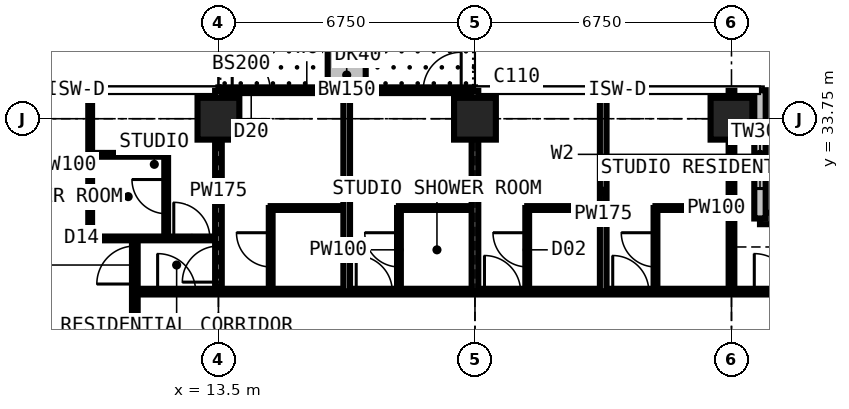
"""IFC4 building model, lengths in metres.
Left out: names, types, materials, properties, quantities, classifications, styles, units other than length and angle.
Written with IfcOpenShell. Run it as: python <this file> out.ifc"""

import sys

from ifc_helpers import new_model, si_unit, direction, frame, frame_2d, origin, origin_2d, place, context, subcontext, project, spatial, rectangle, extrude, element, fill, save


model = new_model("IFC4")
c1 = context("Model", 3, precision=1e-05, world=origin(), true_north=direction((0.0, 1.0)))
c2 = subcontext(c1, "Body", "Model", "MODEL_VIEW")
j1 = project(units=[si_unit("LENGTHUNIT", "METRE"), si_unit("PLANEANGLEUNIT", "RADIAN")], contexts=[c1])
p1 = place(None, origin())
s1 = spatial("IfcSite", under=j1, at=p1, CompositionType="ELEMENT")
p2 = place(p1, origin())
s2 = spatial("IfcBuilding", under=s1, at=p2, CompositionType="ELEMENT")
p3 = place(p2, frame((0.0, 0.0, 211.5)))
s3 = spatial("IfcBuildingStorey", under=s2, at=p3, CompositionType="ELEMENT", Elevation=211.5)
for number, where, z_axis, x_axis in (
    (1, (13.5, 33.75, 0.0), (0.0, 0.0, 1.0), (1.0, 0.0, 0.0)),
    (2, (20.25, 33.75, 0.0), (0.0, 0.0, 1.0), (1.0, 0.0, 0.0)),
    (3, (27.0, 33.75, 0.0), (0.0, 0.0, 1.0), (1.0, 0.0, 0.0)),
):
    element("IfcColumn", number, at=place(p3, frame(where, z_axis=z_axis, x_axis=x_axis)), inside=s3, PredefinedType="COLUMN", context=c2, shape_type="SweptSolid", body=[
        extrude(rectangle(XDim=1.1, YDim=1.1, at=origin_2d()), origin(), (0.0, 0.0, 1.0), 3.6),
    ])
p4 = place(p3, frame((31.125, 31.125, 0.0), z_axis=(0.0, 0.0, 1.0), x_axis=(-1.0, 0.0, 0.0)))
e4 = element("IfcWall", 4, at=p4, inside=s3, PredefinedType="SOLIDWALL", context=c2, shape_type="SweptSolid", body=[
    extrude(rectangle(XDim=3.375, YDim=0.3, at=frame_2d((1.688, 0.0))), origin(), (0.0, 0.0, 1.0), 3.375),
])
p5 = place(p4, frame((0.788, 0.0, 0.6)))
e5 = element("IfcOpeningElement", 5, at=p5, cuts=e4, PredefinedType="OPENING", context=c2, shape_type="SweptSolid", body=[
    extrude(rectangle(XDim=1.8, YDim=2.1, at=frame_2d((0.9, 1.05))), frame((0.0, 0.16, 0.0), z_axis=(0.0, -1.0, 0.0), x_axis=(1.0, 0.0, 0.0)), (0.0, 0.0, 1.0), 0.32),
])
p6 = place(p3, frame((27.75, 31.125, 0.0), z_axis=(0.0, 0.0, 1.0), x_axis=(0.0, 1.0, 0.0)))
e6 = element("IfcWall", 6, at=p6, inside=s3, PredefinedType="SOLIDWALL", context=c2, shape_type="SweptSolid", body=[
    extrude(rectangle(XDim=3.375, YDim=0.3, at=frame_2d((1.688, 0.0))), origin(), (0.0, 0.0, 1.0), 3.375),
])
p7 = place(p6, frame((0.788, 0.0, 0.6)))
e7 = element("IfcOpeningElement", 7, at=p7, cuts=e6, PredefinedType="OPENING", context=c2, shape_type="SweptSolid", body=[
    extrude(rectangle(XDim=1.8, YDim=2.1, at=frame_2d((0.9, 1.05))), frame((0.0, 0.16, 0.0), z_axis=(0.0, -1.0, 0.0), x_axis=(1.0, 0.0, 0.0)), (0.0, 0.0, 1.0), 0.32),
])
p8 = place(p3, frame((13.5, 34.5, 0.0), z_axis=(0.0, 0.0, 1.0), x_axis=(1.0, 0.0, 0.0)))
e8 = element("IfcWall", 8, at=p8, inside=s3, PredefinedType="SOLIDWALL", context=c2, shape_type="SweptSolid", body=[
    extrude(rectangle(XDim=6.75, YDim=0.15, at=frame_2d((3.375, 0.0))), origin(), (0.0, 0.0, 1.0), 3.375),
])
p9 = place(p8, frame((0.363, 0.0, 0.0)))
e9 = element("IfcOpeningElement", 9, at=p9, cuts=e8, PredefinedType="OPENING", context=c2, shape_type="SweptSolid", body=[
    extrude(rectangle(XDim=1.0, YDim=2.2, at=frame_2d((0.5, 1.1))), frame((0.0, 0.085, 0.0), z_axis=(0.0, -1.0, 0.0), x_axis=(1.0, 0.0, 0.0)), (0.0, 0.0, 1.0), 0.17),
])
p10 = place(p8, frame((1.725, 0.0, 0.9)))
e10 = element("IfcOpeningElement", 10, at=p10, cuts=e8, PredefinedType="OPENING", context=c2, shape_type="SweptSolid", body=[
    extrude(rectangle(XDim=1.2, YDim=1.8, at=frame_2d((0.6, 0.9))), frame((0.0, 0.085, 0.0), z_axis=(0.0, -1.0, 0.0), x_axis=(1.0, 0.0, 0.0)), (0.0, 0.0, 1.0), 0.17),
])
p11 = place(p8, frame((5.387, 0.0, 0.0)))
e11 = element("IfcOpeningElement", 11, at=p11, cuts=e8, PredefinedType="OPENING", context=c2, shape_type="SweptSolid", body=[
    extrude(rectangle(XDim=1.0, YDim=2.2, at=frame_2d((0.5, 1.1))), frame((0.0, 0.085, 0.0), z_axis=(0.0, -1.0, 0.0), x_axis=(1.0, 0.0, 0.0)), (0.0, 0.0, 1.0), 0.17),
])
p12 = place(p8, frame((3.825, 0.0, 0.9)))
e12 = element("IfcOpeningElement", 12, at=p12, cuts=e8, PredefinedType="OPENING", context=c2, shape_type="SweptSolid", body=[
    extrude(rectangle(XDim=1.2, YDim=1.8, at=frame_2d((0.6, 0.9))), frame((0.0, 0.085, 0.0), z_axis=(0.0, -1.0, 0.0), x_axis=(1.0, 0.0, 0.0)), (0.0, 0.0, 1.0), 0.17),
])
p13 = place(p3, frame((16.875, 34.6, 0.0), z_axis=(0.0, 0.0, 1.0), x_axis=(0.0, 1.0, 0.0)))
e13 = element("IfcWall", 13, at=p13, inside=s3, PredefinedType="USERDEFINED", context=c2, shape_type="SweptSolid", body=[
    extrude(rectangle(XDim=2.2, YDim=1.0, at=frame_2d((1.1, 0.0))), origin(), (0.0, 0.0, 1.0), 0.9),
])
p14 = place(p3, frame((10.125, 30.6, 0.0), z_axis=(0.0, 0.0, 1.0), x_axis=(0.0, 1.0, 0.0)))
e14 = element("IfcWall", 14, at=p14, inside=s3, PredefinedType="PARTITIONING", context=c2, shape_type="SweptSolid", body=[
    extrude(rectangle(XDim=3.884, YDim=0.1, at=frame_2d((1.942, 0.0))), origin(), (0.0, 0.0, 1.0), 3.375),
])
p15 = place(p3, frame((10.125, 30.6, 0.0), z_axis=(0.0, 0.0, 1.0), x_axis=(1.0, 0.0, 0.0)))
e15 = element("IfcWall", 15, at=p15, inside=s3, PredefinedType="PARTITIONING", context=c2, shape_type="SweptSolid", body=[
    extrude(rectangle(XDim=3.375, YDim=0.1, at=frame_2d((1.688, 0.0))), origin(), (0.0, 0.0, 1.0), 3.375),
])
p16 = place(p15, frame((2.2, 0.0, 0.0)))
e16 = element("IfcOpeningElement", 16, at=p16, cuts=e15, PredefinedType="OPENING", context=c2, shape_type="SweptSolid", body=[
    extrude(rectangle(XDim=0.95, YDim=2.2, at=frame_2d((0.475, 1.1))), frame((0.0, 0.06, 0.0), z_axis=(0.0, -1.0, 0.0), x_axis=(1.0, 0.0, 0.0)), (0.0, 0.0, 1.0), 0.12),
])
p17 = place(p3, frame((10.125, 32.8, 0.0), z_axis=(0.0, 0.0, 1.0), x_axis=(1.0, 0.0, 0.0)))
e17 = element("IfcWall", 17, at=p17, inside=s3, PredefinedType="PARTITIONING", context=c2, shape_type="SweptSolid", body=[
    extrude(rectangle(XDim=2.0, YDim=0.1, at=frame_2d((1.0, 0.0))), origin(), (0.0, 0.0, 1.0), 3.375),
])
p18 = place(p3, frame((11.3, 11.3, 0.0), z_axis=(0.0, 0.0, 1.0), x_axis=(0.0, 1.0, 0.0)))
e18 = element("IfcWall", 18, at=p18, inside=s3, PredefinedType="PARTITIONING", context=c2, shape_type="SweptSolid", body=[
    extrude(rectangle(XDim=19.3, YDim=0.15, at=frame_2d((9.65, 0.0))), origin(), (0.0, 0.0, 1.0), 3.375),
])
p19 = place(p18, frame((18.1, 0.0, 0.0)))
e19 = element("IfcOpeningElement", 19, at=p19, cuts=e18, PredefinedType="OPENING", context=c2, shape_type="SweptSolid", body=[
    extrude(rectangle(XDim=1.0, YDim=2.2, at=frame_2d((0.5, 1.1))), frame((0.0, 0.085, 0.0), z_axis=(0.0, -1.0, 0.0), x_axis=(1.0, 0.0, 0.0)), (0.0, 0.0, 1.0), 0.17),
])
p20 = place(p18, frame((10.137, 0.0, 0.0)))
e20 = element("IfcOpeningElement", 20, at=p20, cuts=e18, PredefinedType="OPENING", context=c2, shape_type="SweptSolid", body=[
    extrude(rectangle(XDim=1.0, YDim=2.2, at=frame_2d((0.5, 1.1))), frame((0.0, 0.085, 0.0), z_axis=(0.0, -1.0, 0.0), x_axis=(1.0, 0.0, 0.0)), (0.0, 0.0, 1.0), 0.17),
])
p21 = place(p3, frame((11.3, 29.2, 0.0), z_axis=(0.0, 0.0, 1.0), x_axis=(1.0, 0.0, 0.0)))
e21 = element("IfcWall", 21, at=p21, inside=s3, PredefinedType="PARTITIONING", context=c2, shape_type="SweptSolid", body=[
    extrude(rectangle(XDim=19.809, YDim=0.15, at=frame_2d((9.904, 0.0))), origin(), (0.0, 0.0, 1.0), 3.375),
])
p22 = place(p21, frame((16.3, 0.0, 0.0)))
e22 = element("IfcOpeningElement", 22, at=p22, cuts=e21, PredefinedType="OPENING", context=c2, shape_type="SweptSolid", body=[
    extrude(rectangle(XDim=1.0, YDim=2.2, at=frame_2d((0.5, 1.1))), frame((0.0, 0.085, 0.0), z_axis=(0.0, -1.0, 0.0), x_axis=(1.0, 0.0, 0.0)), (0.0, 0.0, 1.0), 0.17),
])
p23 = place(p21, frame((5.825, 0.0, 0.0)))
e23 = element("IfcOpeningElement", 23, at=p23, cuts=e21, PredefinedType="OPENING", context=c2, shape_type="SweptSolid", body=[
    extrude(rectangle(XDim=0.95, YDim=2.2, at=frame_2d((0.475, 1.1))), frame((0.0, 0.085, 0.0), z_axis=(0.0, -1.0, 0.0), x_axis=(1.0, 0.0, 0.0)), (0.0, 0.0, 1.0), 0.17),
])
p24 = place(p21, frame((9.2, 0.0, 0.0)))
e24 = element("IfcOpeningElement", 24, at=p24, cuts=e21, PredefinedType="OPENING", context=c2, shape_type="SweptSolid", body=[
    extrude(rectangle(XDim=0.95, YDim=2.2, at=frame_2d((0.475, 1.1))), frame((0.0, 0.085, 0.0), z_axis=(0.0, -1.0, 0.0), x_axis=(1.0, 0.0, 0.0)), (0.0, 0.0, 1.0), 0.17),
])
p25 = place(p21, frame((12.575, 0.0, 0.0)))
e25 = element("IfcOpeningElement", 25, at=p25, cuts=e21, PredefinedType="OPENING", context=c2, shape_type="SweptSolid", body=[
    extrude(rectangle(XDim=0.95, YDim=2.2, at=frame_2d((0.475, 1.1))), frame((0.0, 0.085, 0.0), z_axis=(0.0, -1.0, 0.0), x_axis=(1.0, 0.0, 0.0)), (0.0, 0.0, 1.0), 0.17),
])
p26 = place(p21, frame((0.6, 0.0, 0.0)))
e26 = element("IfcOpeningElement", 26, at=p26, cuts=e21, PredefinedType="OPENING", context=c2, shape_type="SweptSolid", body=[
    extrude(rectangle(XDim=1.0, YDim=2.2, at=frame_2d((0.5, 1.1))), frame((0.0, 0.085, 0.0), z_axis=(0.0, -1.0, 0.0), x_axis=(1.0, 0.0, 0.0)), (0.0, 0.0, 1.0), 0.17),
])
p27 = place(p3, frame((12.125, 30.6, 0.0), z_axis=(0.0, 0.0, 1.0), x_axis=(0.0, 1.0, 0.0)))
e27 = element("IfcWall", 27, at=p27, inside=s3, PredefinedType="PARTITIONING", context=c2, shape_type="SweptSolid", body=[
    extrude(rectangle(XDim=2.2, YDim=0.1, at=frame_2d((1.1, 0.0))), origin(), (0.0, 0.0, 1.0), 3.375),
])
p28 = place(p27, frame((0.65, 0.0, 0.0)))
e28 = element("IfcOpeningElement", 28, at=p28, cuts=e27, PredefinedType="OPENING", context=c2, shape_type="SweptSolid", body=[
    extrude(rectangle(XDim=0.9, YDim=2.2, at=frame_2d((0.45, 1.1))), frame((0.0, 0.06, 0.0), z_axis=(0.0, -1.0, 0.0), x_axis=(1.0, 0.0, 0.0)), (0.0, 0.0, 1.0), 0.12),
])
p29 = place(p3, frame((13.5, 29.2, 0.0), z_axis=(0.0, 0.0, 1.0), x_axis=(0.0, 1.0, 0.0)))
e29 = element("IfcWall", 29, at=p29, inside=s3, PredefinedType="PARTITIONING", context=c2, shape_type="SweptSolid", body=[
    extrude(rectangle(XDim=5.284, YDim=0.175, at=frame_2d((2.642, 0.0))), origin(), (0.0, 0.0, 1.0), 2.877),
])
p30 = place(p29, frame((0.25, 0.0, 0.0)))
e30 = element("IfcOpeningElement", 30, at=p30, cuts=e29, PredefinedType="OPENING", context=c2, shape_type="SweptSolid", body=[
    extrude(rectangle(XDim=0.95, YDim=2.2, at=frame_2d((0.475, 1.1))), frame((0.0, 0.097, 0.0), z_axis=(0.0, -1.0, 0.0), x_axis=(1.0, 0.0, 0.0)), (0.0, 0.0, 1.0), 0.195),
])
p31 = place(p3, frame((14.875, 29.2, 0.0), z_axis=(0.0, 0.0, 1.0), x_axis=(0.0, 1.0, 0.0)))
e31 = element("IfcWall", 31, at=p31, inside=s3, PredefinedType="PARTITIONING", context=c2, shape_type="SweptSolid", body=[
    extrude(rectangle(XDim=2.2, YDim=0.1, at=frame_2d((1.1, 0.0))), origin(), (0.0, 0.0, 1.0), 3.375),
])
p32 = place(p31, frame((0.65, 0.0, 0.0)))
e32 = element("IfcOpeningElement", 32, at=p32, cuts=e31, PredefinedType="OPENING", context=c2, shape_type="SweptSolid", body=[
    extrude(rectangle(XDim=0.9, YDim=2.2, at=frame_2d((0.45, 1.1))), frame((0.0, 0.06, 0.0), z_axis=(0.0, -1.0, 0.0), x_axis=(1.0, 0.0, 0.0)), (0.0, 0.0, 1.0), 0.12),
])
p33 = place(p3, frame((14.875, 31.4, 0.0), z_axis=(0.0, 0.0, 1.0), x_axis=(1.0, 0.0, 0.0)))
e33 = element("IfcWall", 33, at=p33, inside=s3, PredefinedType="PARTITIONING", context=c2, shape_type="SweptSolid", body=[
    extrude(rectangle(XDim=2.0, YDim=0.1, at=frame_2d((1.0, 0.0))), origin(), (0.0, 0.0, 1.0), 3.375),
])
p34 = place(p3, frame((16.875, 29.2, 0.0), z_axis=(0.0, 0.0, 1.0), x_axis=(0.0, 1.0, 0.0)))
e34 = element("IfcWall", 34, at=p34, inside=s3, PredefinedType="PARTITIONING", context=c2, shape_type="SweptSolid", body=[
    extrude(rectangle(XDim=5.284, YDim=0.175, at=frame_2d((2.642, 0.0))), origin(), (0.0, 0.0, 1.0), 3.375),
])
p35 = place(p3, frame((18.25, 29.2, 0.0), z_axis=(0.0, 0.0, 1.0), x_axis=(0.0, 1.0, 0.0)))
e35 = element("IfcWall", 35, at=p35, inside=s3, PredefinedType="PARTITIONING", context=c2, shape_type="SweptSolid", body=[
    extrude(rectangle(XDim=2.2, YDim=0.1, at=frame_2d((1.1, 0.0))), origin(), (0.0, 0.0, 1.0), 3.375),
])
p36 = place(p35, frame((0.65, 0.0, 0.0)))
e36 = element("IfcOpeningElement", 36, at=p36, cuts=e35, PredefinedType="OPENING", context=c2, shape_type="SweptSolid", body=[
    extrude(rectangle(XDim=0.9, YDim=2.2, at=frame_2d((0.45, 1.1))), frame((0.0, 0.06, 0.0), z_axis=(0.0, -1.0, 0.0), x_axis=(1.0, 0.0, 0.0)), (0.0, 0.0, 1.0), 0.12),
])
p37 = place(p3, frame((18.25, 31.4, 0.0), z_axis=(0.0, 0.0, 1.0), x_axis=(1.0, 0.0, 0.0)))
e37 = element("IfcWall", 37, at=p37, inside=s3, PredefinedType="PARTITIONING", context=c2, shape_type="SweptSolid", body=[
    extrude(rectangle(XDim=2.0, YDim=0.1, at=frame_2d((1.0, 0.0))), origin(), (0.0, 0.0, 1.0), 3.375),
])
p38 = place(p3, frame((20.25, 29.2, 0.0), z_axis=(0.0, 0.0, 1.0), x_axis=(0.0, 1.0, 0.0)))
e38 = element("IfcWall", 38, at=p38, inside=s3, PredefinedType="PARTITIONING", context=c2, shape_type="SweptSolid", body=[
    extrude(rectangle(XDim=5.284, YDim=0.175, at=frame_2d((2.642, 0.0))), origin(), (0.0, 0.0, 1.0), 2.877),
])
p39 = place(p3, frame((21.625, 29.2, 0.0), z_axis=(0.0, 0.0, 1.0), x_axis=(0.0, 1.0, 0.0)))
e39 = element("IfcWall", 39, at=p39, inside=s3, PredefinedType="PARTITIONING", context=c2, shape_type="SweptSolid", body=[
    extrude(rectangle(XDim=2.2, YDim=0.1, at=frame_2d((1.1, 0.0))), origin(), (0.0, 0.0, 1.0), 3.375),
])
p40 = place(p39, frame((0.65, 0.0, 0.0)))
e40 = element("IfcOpeningElement", 40, at=p40, cuts=e39, PredefinedType="OPENING", context=c2, shape_type="SweptSolid", body=[
    extrude(rectangle(XDim=0.9, YDim=2.2, at=frame_2d((0.45, 1.1))), frame((0.0, 0.06, 0.0), z_axis=(0.0, -1.0, 0.0), x_axis=(1.0, 0.0, 0.0)), (0.0, 0.0, 1.0), 0.12),
])
p41 = place(p3, frame((21.625, 31.4, 0.0), z_axis=(0.0, 0.0, 1.0), x_axis=(1.0, 0.0, 0.0)))
e41 = element("IfcWall", 41, at=p41, inside=s3, PredefinedType="PARTITIONING", context=c2, shape_type="SweptSolid", body=[
    extrude(rectangle(XDim=2.0, YDim=0.1, at=frame_2d((1.0, 0.0))), origin(), (0.0, 0.0, 1.0), 3.375),
])
p42 = place(p3, frame((23.625, 29.2, 0.0), z_axis=(0.0, 0.0, 1.0), x_axis=(0.0, 1.0, 0.0)))
e42 = element("IfcWall", 42, at=p42, inside=s3, PredefinedType="PARTITIONING", context=c2, shape_type="SweptSolid", body=[
    extrude(rectangle(XDim=5.284, YDim=0.175, at=frame_2d((2.642, 0.0))), origin(), (0.0, 0.0, 1.0), 3.375),
])
p43 = place(p3, frame((25.0, 29.2, 0.0), z_axis=(0.0, 0.0, 1.0), x_axis=(0.0, 1.0, 0.0)))
e43 = element("IfcWall", 43, at=p43, inside=s3, PredefinedType="PARTITIONING", context=c2, shape_type="SweptSolid", body=[
    extrude(rectangle(XDim=2.2, YDim=0.1, at=frame_2d((1.1, 0.0))), origin(), (0.0, 0.0, 1.0), 3.375),
])
p44 = place(p43, frame((0.65, 0.0, 0.0)))
e44 = element("IfcOpeningElement", 44, at=p44, cuts=e43, PredefinedType="OPENING", context=c2, shape_type="SweptSolid", body=[
    extrude(rectangle(XDim=0.9, YDim=2.2, at=frame_2d((0.45, 1.1))), frame((0.0, 0.06, 0.0), z_axis=(0.0, -1.0, 0.0), x_axis=(1.0, 0.0, 0.0)), (0.0, 0.0, 1.0), 0.12),
])
p45 = place(p3, frame((25.0, 31.4, 0.0), z_axis=(0.0, 0.0, 1.0), x_axis=(1.0, 0.0, 0.0)))
e45 = element("IfcWall", 45, at=p45, inside=s3, PredefinedType="PARTITIONING", context=c2, shape_type="SweptSolid", body=[
    extrude(rectangle(XDim=2.0, YDim=0.1, at=frame_2d((1.0, 0.0))), origin(), (0.0, 0.0, 1.0), 3.375),
])
p46 = place(p3, frame((27.0, 29.2, 0.0), z_axis=(0.0, 0.0, 1.0), x_axis=(0.0, 1.0, 0.0)))
e46 = element("IfcWall", 46, at=p46, inside=s3, PredefinedType="PARTITIONING", context=c2, shape_type="SweptSolid", body=[
    extrude(rectangle(XDim=5.284, YDim=0.15, at=frame_2d((2.642, 0.0))), origin(), (0.0, 0.0, 1.0), 2.877),
])
p47 = place(p7, origin())
e47 = element("IfcWindow", 47, at=p47, inside=s3, PartitioningType="SINGLE_PANEL", PredefinedType="WINDOW", context=c2, shape_type="SweptSolid", body=[
    extrude(rectangle(XDim=1.8, YDim=2.1, at=frame_2d((0.9, 1.05))), frame((0.0, 0.03, 0.0), z_axis=(0.0, -1.0, 0.0), x_axis=(1.0, 0.0, 0.0)), (0.0, 0.0, 1.0), 0.06),
])
fill(e7, e47)
p48 = place(p9, origin())
e48 = element("IfcDoor", 48, at=p48, inside=s3, OperationType="SINGLE_SWING_LEFT", PredefinedType="DOOR", context=c2, shape_type="SweptSolid", body=[
    extrude(rectangle(XDim=1.0, YDim=2.2, at=frame_2d((0.5, 1.1))), frame((0.0, 0.025, 0.0), z_axis=(0.0, -1.0, 0.0), x_axis=(1.0, 0.0, 0.0)), (0.0, 0.0, 1.0), 0.05),
])
fill(e9, e48)
p49 = place(p10, origin())
e49 = element("IfcWindow", 49, at=p49, inside=s3, PartitioningType="SINGLE_PANEL", PredefinedType="WINDOW", context=c2, shape_type="SweptSolid", body=[
    extrude(rectangle(XDim=1.2, YDim=1.8, at=frame_2d((0.6, 0.9))), frame((0.0, 0.03, 0.0), z_axis=(0.0, -1.0, 0.0), x_axis=(1.0, 0.0, 0.0)), (0.0, 0.0, 1.0), 0.06),
])
fill(e10, e49)
p50 = place(p11, origin())
e50 = element("IfcDoor", 50, at=p50, inside=s3, OperationType="SINGLE_SWING_RIGHT", PredefinedType="DOOR", context=c2, shape_type="SweptSolid", body=[
    extrude(rectangle(XDim=1.0, YDim=2.2, at=frame_2d((0.5, 1.1))), frame((0.0, 0.025, 0.0), z_axis=(0.0, -1.0, 0.0), x_axis=(1.0, 0.0, 0.0)), (0.0, 0.0, 1.0), 0.05),
])
fill(e11, e50)
p51 = place(p12, origin())
e51 = element("IfcWindow", 51, at=p51, inside=s3, PartitioningType="SINGLE_PANEL", PredefinedType="WINDOW", context=c2, shape_type="SweptSolid", body=[
    extrude(rectangle(XDim=1.2, YDim=1.8, at=frame_2d((0.6, 0.9))), frame((0.0, 0.03, 0.0), z_axis=(0.0, -1.0, 0.0), x_axis=(1.0, 0.0, 0.0)), (0.0, 0.0, 1.0), 0.06),
])
fill(e12, e51)
p52 = place(p22, origin())
e52 = element("IfcDoor", 52, at=p52, inside=s3, OperationType="SINGLE_SWING_LEFT", PredefinedType="DOOR", context=c2, shape_type="SweptSolid", body=[
    extrude(rectangle(XDim=1.0, YDim=2.2, at=frame_2d((0.5, 1.1))), frame((0.0, 0.025, 0.0), z_axis=(0.0, -1.0, 0.0), x_axis=(1.0, 0.0, 0.0)), (0.0, 0.0, 1.0), 0.05),
])
fill(e22, e52)
p53 = place(p16, origin())
e53 = element("IfcDoor", 53, at=p53, inside=s3, OperationType="SINGLE_SWING_LEFT", PredefinedType="DOOR", context=c2, shape_type="SweptSolid", body=[
    extrude(rectangle(XDim=0.95, YDim=2.2, at=frame_2d((0.475, 1.1))), frame((0.0, 0.025, 0.0), z_axis=(0.0, -1.0, 0.0), x_axis=(1.0, 0.0, 0.0)), (0.0, 0.0, 1.0), 0.05),
])
fill(e16, e53)
p54 = place(p28, origin())
e54 = element("IfcDoor", 54, at=p54, inside=s3, OperationType="SINGLE_SWING_RIGHT", PredefinedType="DOOR", context=c2, shape_type="SweptSolid", body=[
    extrude(rectangle(XDim=0.9, YDim=2.2, at=frame_2d((0.45, 1.1))), frame((0.0, 0.025, 0.0), z_axis=(0.0, -1.0, 0.0), x_axis=(1.0, 0.0, 0.0)), (0.0, 0.0, 1.0), 0.05),
])
fill(e28, e54)
p55 = place(p30, origin())
e55 = element("IfcDoor", 55, at=p55, inside=s3, OperationType="SINGLE_SWING_LEFT", PredefinedType="DOOR", context=c2, shape_type="SweptSolid", body=[
    extrude(rectangle(XDim=0.95, YDim=2.2, at=frame_2d((0.475, 1.1))), frame((0.0, 0.025, 0.0), z_axis=(0.0, -1.0, 0.0), x_axis=(1.0, 0.0, 0.0)), (0.0, 0.0, 1.0), 0.05),
])
fill(e30, e55)
p56 = place(p32, origin())
e56 = element("IfcDoor", 56, at=p56, inside=s3, OperationType="SINGLE_SWING_RIGHT", PredefinedType="DOOR", context=c2, shape_type="SweptSolid", body=[
    extrude(rectangle(XDim=0.9, YDim=2.2, at=frame_2d((0.45, 1.1))), frame((0.0, 0.025, 0.0), z_axis=(0.0, -1.0, 0.0), x_axis=(1.0, 0.0, 0.0)), (0.0, 0.0, 1.0), 0.05),
])
fill(e32, e56)
p57 = place(p23, origin())
e57 = element("IfcDoor", 57, at=p57, inside=s3, OperationType="SINGLE_SWING_LEFT", PredefinedType="DOOR", context=c2, shape_type="SweptSolid", body=[
    extrude(rectangle(XDim=0.95, YDim=2.2, at=frame_2d((0.475, 1.1))), frame((0.0, 0.025, 0.0), z_axis=(0.0, -1.0, 0.0), x_axis=(1.0, 0.0, 0.0)), (0.0, 0.0, 1.0), 0.05),
])
fill(e23, e57)
p58 = place(p36, origin())
e58 = element("IfcDoor", 58, at=p58, inside=s3, OperationType="SINGLE_SWING_RIGHT", PredefinedType="DOOR", context=c2, shape_type="SweptSolid", body=[
    extrude(rectangle(XDim=0.9, YDim=2.2, at=frame_2d((0.45, 1.1))), frame((0.0, 0.025, 0.0), z_axis=(0.0, -1.0, 0.0), x_axis=(1.0, 0.0, 0.0)), (0.0, 0.0, 1.0), 0.05),
])
fill(e36, e58)
p59 = place(p24, origin())
e59 = element("IfcDoor", 59, at=p59, inside=s3, OperationType="SINGLE_SWING_LEFT", PredefinedType="DOOR", context=c2, shape_type="SweptSolid", body=[
    extrude(rectangle(XDim=0.95, YDim=2.2, at=frame_2d((0.475, 1.1))), frame((0.0, 0.025, 0.0), z_axis=(0.0, -1.0, 0.0), x_axis=(1.0, 0.0, 0.0)), (0.0, 0.0, 1.0), 0.05),
])
fill(e24, e59)
p60 = place(p40, origin())
e60 = element("IfcDoor", 60, at=p60, inside=s3, OperationType="SINGLE_SWING_RIGHT", PredefinedType="DOOR", context=c2, shape_type="SweptSolid", body=[
    extrude(rectangle(XDim=0.9, YDim=2.2, at=frame_2d((0.45, 1.1))), frame((0.0, 0.025, 0.0), z_axis=(0.0, -1.0, 0.0), x_axis=(1.0, 0.0, 0.0)), (0.0, 0.0, 1.0), 0.05),
])
fill(e40, e60)
p61 = place(p25, origin())
e61 = element("IfcDoor", 61, at=p61, inside=s3, OperationType="SINGLE_SWING_LEFT", PredefinedType="DOOR", context=c2, shape_type="SweptSolid", body=[
    extrude(rectangle(XDim=0.95, YDim=2.2, at=frame_2d((0.475, 1.1))), frame((0.0, 0.025, 0.0), z_axis=(0.0, -1.0, 0.0), x_axis=(1.0, 0.0, 0.0)), (0.0, 0.0, 1.0), 0.05),
])
fill(e25, e61)
p62 = place(p44, origin())
e62 = element("IfcDoor", 62, at=p62, inside=s3, OperationType="SINGLE_SWING_RIGHT", PredefinedType="DOOR", context=c2, shape_type="SweptSolid", body=[
    extrude(rectangle(XDim=0.9, YDim=2.2, at=frame_2d((0.45, 1.1))), frame((0.0, 0.025, 0.0), z_axis=(0.0, -1.0, 0.0), x_axis=(1.0, 0.0, 0.0)), (0.0, 0.0, 1.0), 0.05),
])
fill(e44, e62)
p63 = place(p26, origin())
e63 = element("IfcDoor", 63, at=p63, inside=s3, OperationType="SINGLE_SWING_LEFT", PredefinedType="DOOR", context=c2, shape_type="SweptSolid", body=[
    extrude(rectangle(XDim=1.0, YDim=2.2, at=frame_2d((0.5, 1.1))), frame((0.0, 0.025, 0.0), z_axis=(0.0, -1.0, 0.0), x_axis=(1.0, 0.0, 0.0)), (0.0, 0.0, 1.0), 0.05),
])
fill(e26, e63)
p64 = place(p19, origin())
e64 = element("IfcDoor", 64, at=p64, inside=s3, OperationType="SINGLE_SWING_LEFT", PredefinedType="DOOR", context=c2, shape_type="SweptSolid", body=[
    extrude(rectangle(XDim=1.0, YDim=2.2, at=frame_2d((0.5, 1.1))), frame((0.0, 0.025, 0.0), z_axis=(0.0, -1.0, 0.0), x_axis=(1.0, 0.0, 0.0)), (0.0, 0.0, 1.0), 0.05),
])
fill(e19, e64)
save(model, sys.argv[1])
